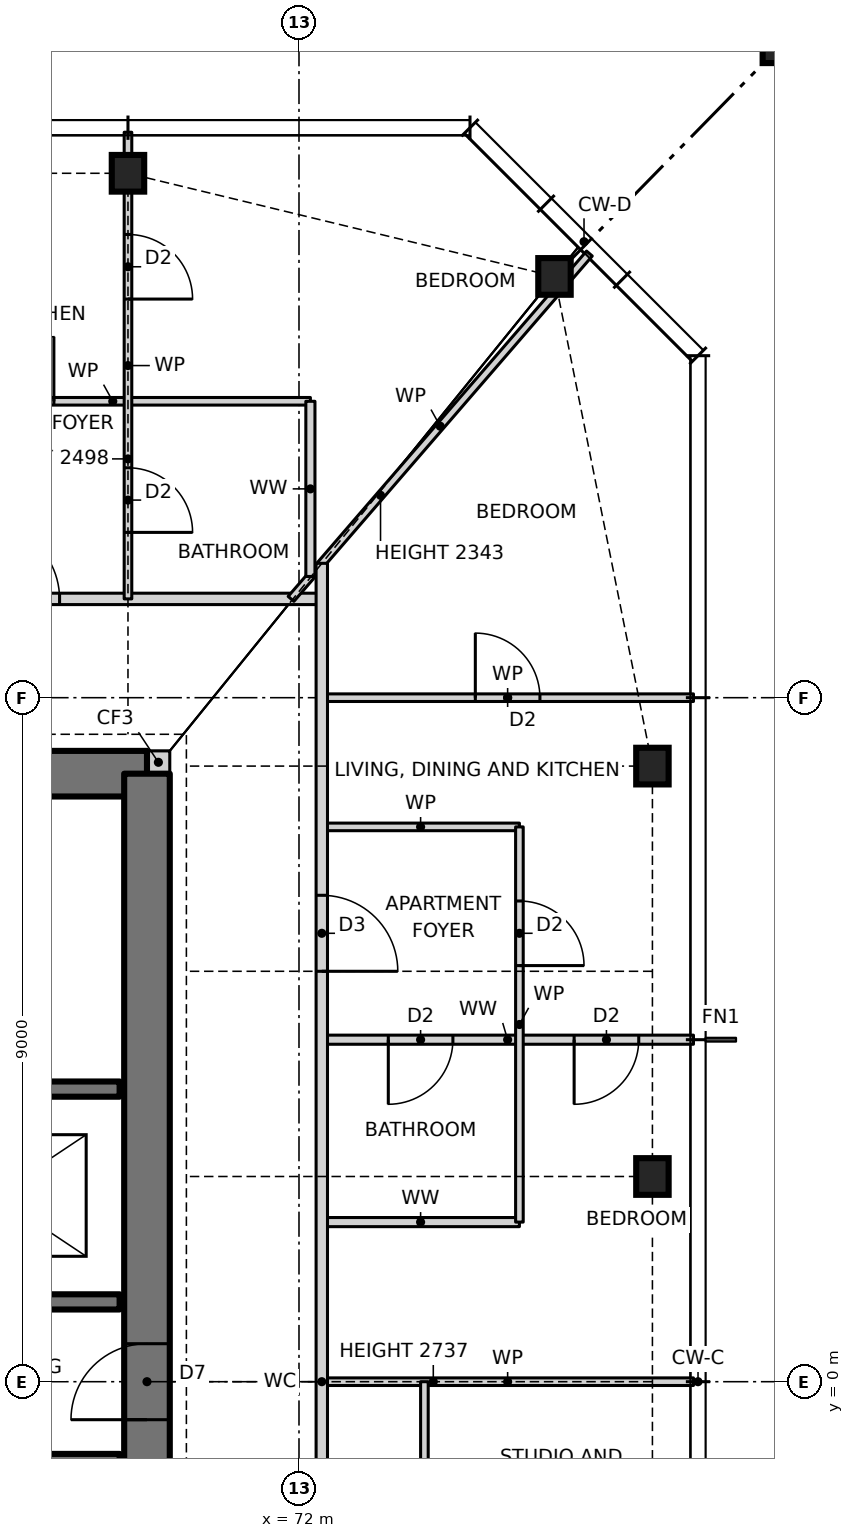
"""IFC4 building model, lengths in metres.
Left out: names, types, materials, properties, quantities, classifications, styles, units other than length and angle.
Written with IfcOpenShell. Run it as: python <this file> out.ifc"""

import sys

from ifc_helpers import new_model, si_unit, direction, frame, frame_2d, origin, origin_2d, place, context, subcontext, project, spatial, rectangle, hollow_rectangle, i_section, extrude, element, fill, save


model = new_model("IFC4")
c1 = context("Model", 3, precision=1e-05, world=origin(), true_north=direction((0.0, 1.0)))
c2 = subcontext(c1, "Body", "Model", "MODEL_VIEW")
j1 = project(units=[si_unit("LENGTHUNIT", "METRE"), si_unit("PLANEANGLEUNIT", "RADIAN")], contexts=[c1])
p1 = place(None, origin())
s1 = spatial("IfcSite", under=j1, at=p1, CompositionType="ELEMENT")
p2 = place(p1, origin())
s2 = spatial("IfcBuilding", under=s1, at=p2, CompositionType="ELEMENT")
p3 = place(p2, frame((0.0, 0.0, 94.5)))
s3 = spatial("IfcBuildingStorey", under=s2, at=p3, CompositionType="ELEMENT", Elevation=94.5)
for number, where, z_axis, x_axis in (
    (1, (76.65, 2.7, 0.0), (0.0, 0.0, 1.0), (1.0, 0.0, 0.0)),
    (2, (76.65, 8.1, 0.0), (0.0, 0.0, 1.0), (1.0, 0.0, 0.0)),
    (3, (75.361, 14.543, 0.0), (0.0, 0.0, 1.0), (1.0, 0.0, 0.0)),
    (4, (69.75, 15.9, 0.0), (0.0, 0.0, 1.0), (1.0, 0.0, 0.0)),
):
    element("IfcColumn", number, at=place(p3, frame(where, z_axis=z_axis, x_axis=x_axis)), inside=s3, PredefinedType="COLUMN", context=c2, shape_type="SweptSolid", body=[
        extrude(i_section(OverallWidth=0.427, OverallDepth=0.483, WebThickness=0.051, FlangeThickness=0.082, at=origin_2d()), origin(), (0.0, 0.0, 1.0), 3.5),
    ])
p4 = place(p3, frame((78.65, 17.9, 0.0), z_axis=(0.0, 0.0, 1.0), x_axis=(1.0, 0.0, 0.0)))
e5 = element("IfcColumn", 5, at=p4, inside=s3, PredefinedType="COLUMN", context=c2, shape_type="SweptSolid", body=[
    extrude(hollow_rectangle(XDim=1.1, YDim=1.1, WallThickness=0.06, at=origin_2d()), origin(), (0.0, 0.0, 1.0), 3.5),
])
p5 = place(p3, frame((70.0, 8.15, 0.0), z_axis=(0.0, 0.0, 1.0), x_axis=(1.0, 0.0, 0.0)))
e6 = element("IfcWall", 6, at=p5, inside=s3, PredefinedType="SOLIDWALL", context=c2, shape_type="SweptSolid", body=[
    extrude(rectangle(XDim=0.3, YDim=0.3, at=frame_2d((0.15, 0.0))), origin(), (0.0, 0.0, 1.0), 3.5),
])
p6 = place(p3, frame((70.0, 8.0, 0.0), z_axis=(0.0, 0.0, 1.0), x_axis=(-1.0, 0.0, 0.0)))
e7 = element("IfcWall", 7, at=p6, inside=s3, PredefinedType="SHEAR", context=c2, shape_type="SweptSolid", body=[
    extrude(rectangle(XDim=14.0, YDim=0.6, at=frame_2d((7.0, 0.0))), origin(), (0.0, 0.0, 1.0), 3.5),
])
p7 = place(p6, frame((8.2, 0.0, 0.0)))
e8 = element("IfcOpeningElement", 8, at=p7, cuts=e7, PredefinedType="OPENING", context=c2, shape_type="SweptSolid", body=[
    extrude(rectangle(XDim=0.9, YDim=2.1, at=frame_2d((0.45, 1.05))), frame((0.0, 0.31, 0.0), z_axis=(0.0, -1.0, 0.0), x_axis=(1.0, 0.0, 0.0)), (0.0, 0.0, 1.0), 0.62),
])
p8 = place(p6, frame((3.2, 0.0, 0.0)))
e9 = element("IfcOpeningElement", 9, at=p8, cuts=e7, PredefinedType="OPENING", context=c2, shape_type="SweptSolid", body=[
    extrude(rectangle(XDim=0.9, YDim=2.1, at=frame_2d((0.45, 1.05))), frame((0.0, 0.31, 0.0), z_axis=(0.0, -1.0, 0.0), x_axis=(1.0, 0.0, 0.0)), (0.0, 0.0, 1.0), 0.62),
])
p9 = place(p3, frame((70.0, -8.0, 0.0), z_axis=(0.0, 0.0, 1.0), x_axis=(0.0, 1.0, 0.0)))
e10 = element("IfcWall", 10, at=p9, inside=s3, PredefinedType="SHEAR", context=c2, shape_type="SweptSolid", body=[
    extrude(rectangle(XDim=16.0, YDim=0.6, at=frame_2d((8.0, 0.0))), origin(), (0.0, 0.0, 1.0), 3.5),
])
p10 = place(p9, frame((7.5, 0.0, 0.0)))
e11 = element("IfcOpeningElement", 11, at=p10, cuts=e10, PredefinedType="OPENING", context=c2, shape_type="SweptSolid", body=[
    extrude(rectangle(XDim=1.0, YDim=2.1, at=frame_2d((0.5, 1.05))), frame((0.0, 0.31, 0.0), z_axis=(0.0, -1.0, 0.0), x_axis=(1.0, 0.0, 0.0)), (0.0, 0.0, 1.0), 0.62),
])
p11 = place(p3, frame((56.36, -1.05, 0.0), z_axis=(0.0, 0.0, 1.0), x_axis=(1.0, 0.0, 0.0)))
e12 = element("IfcWall", 12, at=p11, inside=s3, PredefinedType="SOLIDWALL", context=c2, shape_type="SweptSolid", body=[
    extrude(rectangle(XDim=13.28, YDim=0.2, at=frame_2d((6.64, 0.0))), origin(), (0.0, 0.0, 1.0), 3.5),
])
p12 = place(p11, frame((11.11, 0.0, 0.0)))
e13 = element("IfcOpeningElement", 13, at=p12, cuts=e12, PredefinedType="OPENING", context=c2, shape_type="SweptSolid", body=[
    extrude(rectangle(XDim=1.0, YDim=2.1, at=frame_2d((0.5, 1.05))), frame((0.0, 0.11, 0.0), z_axis=(0.0, -1.0, 0.0), x_axis=(1.0, 0.0, 0.0)), (0.0, 0.0, 1.0), 0.22),
])
p13 = place(p11, frame((1.087, 0.0, 0.0)))
e14 = element("IfcOpeningElement", 14, at=p13, cuts=e12, PredefinedType="OPENING", context=c2, shape_type="SweptSolid", body=[
    extrude(rectangle(XDim=1.1, YDim=2.1, at=frame_2d((0.55, 1.05))), frame((0.0, 0.11, 0.0), z_axis=(0.0, -1.0, 0.0), x_axis=(1.0, 0.0, 0.0)), (0.0, 0.0, 1.0), 0.22),
])
p14 = place(p11, frame((4.39, 0.0, 0.0)))
e15 = element("IfcOpeningElement", 15, at=p14, cuts=e12, PredefinedType="OPENING", context=c2, shape_type="SweptSolid", body=[
    extrude(rectangle(XDim=1.1, YDim=2.1, at=frame_2d((0.55, 1.05))), frame((0.0, 0.11, 0.0), z_axis=(0.0, -1.0, 0.0), x_axis=(1.0, 0.0, 0.0)), (0.0, 0.0, 1.0), 0.22),
])
p15 = place(p11, frame((7.724, 0.0, 0.0)))
e16 = element("IfcOpeningElement", 16, at=p15, cuts=e12, PredefinedType="OPENING", context=c2, shape_type="SweptSolid", body=[
    extrude(rectangle(XDim=1.1, YDim=2.1, at=frame_2d((0.55, 1.05))), frame((0.0, 0.11, 0.0), z_axis=(0.0, -1.0, 0.0), x_axis=(1.0, 0.0, 0.0)), (0.0, 0.0, 1.0), 0.22),
])
p16 = place(p3, frame((72.3, 0.0, 0.0), z_axis=(0.0, 0.0, 1.0), x_axis=(1.0, 0.0, 0.0)))
e17 = element("IfcWall", 17, at=p16, inside=s3, PredefinedType="PARTITIONING", context=c2, shape_type="SweptSolid", body=[
    extrude(rectangle(XDim=4.89, YDim=0.1, at=frame_2d((2.445, 0.0))), origin(), (0.0, 0.0, 1.0), 2.737),
])
p17 = place(p3, frame((56.36, 1.05, 0.0), z_axis=(0.0, 0.0, 1.0), x_axis=(1.0, 0.0, 0.0)))
e18 = element("IfcWall", 18, at=p17, inside=s3, PredefinedType="SOLIDWALL", context=c2, shape_type="SweptSolid", body=[
    extrude(rectangle(XDim=13.28, YDim=0.2, at=frame_2d((6.64, 0.0))), origin(), (0.0, 0.0, 1.0), 3.5),
])
p18 = place(p17, frame((1.17, 0.0, 0.0)))
e19 = element("IfcOpeningElement", 19, at=p18, cuts=e18, PredefinedType="OPENING", context=c2, shape_type="SweptSolid", body=[
    extrude(rectangle(XDim=1.0, YDim=2.1, at=frame_2d((0.5, 1.05))), frame((0.0, 0.11, 0.0), z_axis=(0.0, -1.0, 0.0), x_axis=(1.0, 0.0, 0.0)), (0.0, 0.0, 1.0), 0.22),
])
p19 = place(p17, frame((6.19, 0.0, 0.0)))
e20 = element("IfcOpeningElement", 20, at=p19, cuts=e18, PredefinedType="OPENING", context=c2, shape_type="SweptSolid", body=[
    extrude(rectangle(XDim=0.9, YDim=2.1, at=frame_2d((0.45, 1.05))), frame((0.0, 0.11, 0.0), z_axis=(0.0, -1.0, 0.0), x_axis=(1.0, 0.0, 0.0)), (0.0, 0.0, 1.0), 0.22),
])
p20 = place(p17, frame((10.96, 0.0, 0.0)))
e21 = element("IfcOpeningElement", 21, at=p20, cuts=e18, PredefinedType="OPENING", context=c2, shape_type="SweptSolid", body=[
    extrude(rectangle(XDim=1.3, YDim=2.1, at=frame_2d((0.65, 1.05))), frame((0.0, 0.11, 0.0), z_axis=(0.0, -1.0, 0.0), x_axis=(1.0, 0.0, 0.0)), (0.0, 0.0, 1.0), 0.22),
])
p21 = place(p3, frame((72.3, 2.1, 0.0), z_axis=(0.0, 0.0, 1.0), x_axis=(1.0, 0.0, 0.0)))
e22 = element("IfcWall", 22, at=p21, inside=s3, PredefinedType="PARTITIONING", context=c2, shape_type="SweptSolid", body=[
    extrude(rectangle(XDim=2.6, YDim=0.12, at=frame_2d((1.3, 0.0))), origin(), (0.0, 0.0, 1.0), 3.27),
])
p22 = place(p3, frame((59.7, 3.85, 0.0), z_axis=(0.0, 0.0, 1.0), x_axis=(1.0, 0.0, 0.0)))
e23 = element("IfcWall", 23, at=p22, inside=s3, PredefinedType="SOLIDWALL", context=c2, shape_type="SweptSolid", body=[
    extrude(rectangle(XDim=9.94, YDim=0.2, at=frame_2d((4.97, 0.0))), origin(), (0.0, 0.0, 1.0), 3.5),
])
p23 = place(p3, frame((72.3, 4.5, 0.0), z_axis=(0.0, 0.0, 1.0), x_axis=(1.0, 0.0, 0.0)))
e24 = element("IfcWall", 24, at=p23, inside=s3, PredefinedType="PARTITIONING", context=c2, shape_type="SweptSolid", body=[
    extrude(rectangle(XDim=4.89, YDim=0.12, at=frame_2d((2.445, 0.0))), origin(), (0.0, 0.0, 1.0), 3.27),
])
p24 = place(p23, frame((0.875, 0.0, 0.0)))
e25 = element("IfcOpeningElement", 25, at=p24, cuts=e24, PredefinedType="OPENING", context=c2, shape_type="SweptSolid", body=[
    extrude(rectangle(XDim=0.85, YDim=2.1, at=frame_2d((0.425, 1.05))), frame((0.0, 0.07, 0.0), z_axis=(0.0, -1.0, 0.0), x_axis=(1.0, 0.0, 0.0)), (0.0, 0.0, 1.0), 0.14),
])
p25 = place(p23, frame((3.32, 0.0, 0.0)))
e26 = element("IfcOpeningElement", 26, at=p25, cuts=e24, PredefinedType="OPENING", context=c2, shape_type="SweptSolid", body=[
    extrude(rectangle(XDim=0.85, YDim=2.1, at=frame_2d((0.425, 1.05))), frame((0.0, 0.07, 0.0), z_axis=(0.0, -1.0, 0.0), x_axis=(1.0, 0.0, 0.0)), (0.0, 0.0, 1.0), 0.14),
])
p26 = place(p3, frame((72.3, 7.3, 0.0), z_axis=(0.0, 0.0, 1.0), x_axis=(1.0, 0.0, 0.0)))
e27 = element("IfcWall", 27, at=p26, inside=s3, PredefinedType="PARTITIONING", context=c2, shape_type="SweptSolid", body=[
    extrude(rectangle(XDim=2.6, YDim=0.1, at=frame_2d((1.3, 0.0))), origin(), (0.0, 0.0, 1.0), 3.27),
])
p27 = place(p3, frame((72.3, 9.0, 0.0), z_axis=(0.0, 0.0, 1.0), x_axis=(1.0, 0.0, 0.0)))
e28 = element("IfcWall", 28, at=p27, inside=s3, PredefinedType="PARTITIONING", context=c2, shape_type="SweptSolid", body=[
    extrude(rectangle(XDim=4.89, YDim=0.1, at=frame_2d((2.445, 0.0))), origin(), (0.0, 0.0, 1.0), 3.27),
])
p28 = place(p27, frame((2.02, 0.0, 0.0)))
e29 = element("IfcOpeningElement", 29, at=p28, cuts=e28, PredefinedType="OPENING", context=c2, shape_type="SweptSolid", body=[
    extrude(rectangle(XDim=0.85, YDim=2.1, at=frame_2d((0.425, 1.05))), frame((0.0, 0.06, 0.0), z_axis=(0.0, -1.0, 0.0), x_axis=(1.0, 0.0, 0.0)), (0.0, 0.0, 1.0), 0.12),
])
p29 = place(p3, frame((53.7, 10.3, 0.0), z_axis=(0.0, 0.0, 1.0), x_axis=(1.0, 0.0, 0.0)))
e30 = element("IfcWall", 30, at=p29, inside=s3, PredefinedType="PARTITIONING", context=c2, shape_type="SweptSolid", body=[
    extrude(rectangle(XDim=18.6, YDim=0.15, at=frame_2d((9.3, 0.0))), origin(), (0.0, 0.0, 1.0), 3.27),
])
p30 = place(p29, frame((14.15, 0.0, 0.0)))
e31 = element("IfcOpeningElement", 31, at=p30, cuts=e30, PredefinedType="OPENING", context=c2, shape_type="SweptSolid", body=[
    extrude(rectangle(XDim=1.0, YDim=2.1, at=frame_2d((0.5, 1.05))), frame((0.0, 0.085, 0.0), z_axis=(0.0, -1.0, 0.0), x_axis=(1.0, 0.0, 0.0)), (0.0, 0.0, 1.0), 0.17),
])
p31 = place(p29, frame((9.925, 0.0, 0.0)))
e32 = element("IfcOpeningElement", 32, at=p31, cuts=e30, PredefinedType="OPENING", context=c2, shape_type="SweptSolid", body=[
    extrude(rectangle(XDim=1.0, YDim=2.1, at=frame_2d((0.5, 1.05))), frame((0.0, 0.085, 0.0), z_axis=(0.0, -1.0, 0.0), x_axis=(1.0, 0.0, 0.0)), (0.0, 0.0, 1.0), 0.17),
])
p32 = place(p29, frame((5.15, 0.0, 0.0)))
e33 = element("IfcOpeningElement", 33, at=p32, cuts=e30, PredefinedType="OPENING", context=c2, shape_type="SweptSolid", body=[
    extrude(rectangle(XDim=1.0, YDim=2.1, at=frame_2d((0.5, 1.05))), frame((0.0, 0.085, 0.0), z_axis=(0.0, -1.0, 0.0), x_axis=(1.0, 0.0, 0.0)), (0.0, 0.0, 1.0), 0.17),
])
p33 = place(p3, frame((66.95, 12.9, 0.0), z_axis=(0.0, 0.0, 1.0), x_axis=(1.0, 0.0, 0.0)))
e34 = element("IfcWall", 34, at=p33, inside=s3, PredefinedType="PARTITIONING", context=c2, shape_type="SweptSolid", body=[
    extrude(rectangle(XDim=5.2, YDim=0.1, at=frame_2d((2.6, 0.0))), origin(), (0.0, 0.0, 1.0), 3.27),
])
p34 = place(p33, frame((0.975, 0.0, 0.0)))
e35 = element("IfcOpeningElement", 35, at=p34, cuts=e34, PredefinedType="OPENING", context=c2, shape_type="SweptSolid", body=[
    extrude(rectangle(XDim=0.85, YDim=2.1, at=frame_2d((0.425, 1.05))), frame((0.0, 0.06, 0.0), z_axis=(0.0, -1.0, 0.0), x_axis=(1.0, 0.0, 0.0)), (0.0, 0.0, 1.0), 0.12),
])
p35 = place(p3, frame((71.895, 10.3, 0.0), z_axis=(0.0, 0.0, 1.0), x_axis=(0.65378286253, 0.756682211144, 0.0)))
e36 = element("IfcWall", 36, at=p35, inside=s3, PredefinedType="PARTITIONING", context=c2, shape_type="SweptSolid", body=[
    extrude(rectangle(XDim=6.005, YDim=0.1, at=frame_2d((3.002, 0.0))), origin(), (0.0, 0.0, 1.0), 2.343),
])
p36 = place(p3, frame((74.9, 2.1, 0.0), z_axis=(0.0, 0.0, 1.0), x_axis=(0.0, 1.0, 0.0)))
e37 = element("IfcWall", 37, at=p36, inside=s3, PredefinedType="PARTITIONING", context=c2, shape_type="SweptSolid", body=[
    extrude(rectangle(XDim=5.2, YDim=0.1, at=frame_2d((2.6, 0.0))), origin(), (0.0, 0.0, 1.0), 3.27),
])
p37 = place(p36, frame((3.375, 0.0, 0.0)))
e38 = element("IfcOpeningElement", 38, at=p37, cuts=e37, PredefinedType="OPENING", context=c2, shape_type="SweptSolid", body=[
    extrude(rectangle(XDim=0.85, YDim=2.1, at=frame_2d((0.425, 1.05))), frame((0.0, 0.06, 0.0), z_axis=(0.0, -1.0, 0.0), x_axis=(1.0, 0.0, 0.0)), (0.0, 0.0, 1.0), 0.12),
])
p38 = place(p3, frame((73.65, -4.5, 0.0), z_axis=(0.0, 0.0, 1.0), x_axis=(0.0, 1.0, 0.0)))
e39 = element("IfcWall", 39, at=p38, inside=s3, PredefinedType="PARTITIONING", context=c2, shape_type="SweptSolid", body=[
    extrude(rectangle(XDim=4.5, YDim=0.1, at=frame_2d((2.25, 0.0))), origin(), (0.0, 0.0, 1.0), 3.27),
])
p39 = place(p38, frame((0.7, 0.0, 0.0)))
e40 = element("IfcOpeningElement", 40, at=p39, cuts=e39, PredefinedType="OPENING", context=c2, shape_type="SweptSolid", body=[
    extrude(rectangle(XDim=0.85, YDim=2.1, at=frame_2d((0.425, 1.05))), frame((0.0, 0.06, 0.0), z_axis=(0.0, -1.0, 0.0), x_axis=(1.0, 0.0, 0.0)), (0.0, 0.0, 1.0), 0.12),
])
p40 = place(p3, frame((72.3, -10.768, 0.0), z_axis=(0.0, 0.0, 1.0), x_axis=(0.0, 1.0, 0.0)))
e41 = element("IfcWall", 41, at=p40, inside=s3, PredefinedType="PARTITIONING", context=c2, shape_type="SweptSolid", body=[
    extrude(rectangle(XDim=21.536, YDim=0.15, at=frame_2d((10.768, 0.0))), origin(), (0.0, 0.0, 1.0), 3.27),
])
p41 = place(p40, frame((2.668, 0.0, 0.0)))
e42 = element("IfcOpeningElement", 42, at=p41, cuts=e41, PredefinedType="OPENING", context=c2, shape_type="SweptSolid", body=[
    extrude(rectangle(XDim=1.0, YDim=2.1, at=frame_2d((0.5, 1.05))), frame((0.0, 0.085, 0.0), z_axis=(0.0, -1.0, 0.0), x_axis=(1.0, 0.0, 0.0)), (0.0, 0.0, 1.0), 0.17),
])
p42 = place(p40, frame((6.893, 0.0, 0.0)))
e43 = element("IfcOpeningElement", 43, at=p42, cuts=e41, PredefinedType="OPENING", context=c2, shape_type="SweptSolid", body=[
    extrude(rectangle(XDim=1.0, YDim=2.1, at=frame_2d((0.5, 1.05))), frame((0.0, 0.085, 0.0), z_axis=(0.0, -1.0, 0.0), x_axis=(1.0, 0.0, 0.0)), (0.0, 0.0, 1.0), 0.17),
])
p43 = place(p40, frame((16.168, 0.0, 0.0)))
e44 = element("IfcOpeningElement", 44, at=p43, cuts=e41, PredefinedType="OPENING", context=c2, shape_type="SweptSolid", body=[
    extrude(rectangle(XDim=1.0, YDim=2.1, at=frame_2d((0.5, 1.05))), frame((0.0, 0.085, 0.0), z_axis=(0.0, -1.0, 0.0), x_axis=(1.0, 0.0, 0.0)), (0.0, 0.0, 1.0), 0.17),
])
p44 = place(p3, frame((72.15, 10.595, 0.0), z_axis=(0.0, 0.0, 1.0), x_axis=(0.0, 1.0, 0.0)))
e45 = element("IfcWall", 45, at=p44, inside=s3, PredefinedType="PARTITIONING", context=c2, shape_type="SweptSolid", body=[
    extrude(rectangle(XDim=2.305, YDim=0.12, at=frame_2d((1.152, 0.0))), origin(), (0.0, 0.0, 1.0), 3.27),
])
p45 = place(p3, frame((69.75, 10.3, 0.0), z_axis=(0.0, 0.0, 1.0), x_axis=(0.0, 1.0, 0.0)))
e46 = element("IfcWall", 46, at=p45, inside=s3, PredefinedType="PARTITIONING", context=c2, shape_type="SweptSolid", body=[
    extrude(rectangle(XDim=6.14, YDim=0.1, at=frame_2d((3.07, 0.0))), origin(), (0.0, 0.0, 1.0), 2.498),
])
p46 = place(p45, frame((0.875, 0.0, 0.0)))
e47 = element("IfcOpeningElement", 47, at=p46, cuts=e46, PredefinedType="OPENING", context=c2, shape_type="SweptSolid", body=[
    extrude(rectangle(XDim=0.85, YDim=2.1, at=frame_2d((0.425, 1.05))), frame((0.0, 0.06, 0.0), z_axis=(0.0, -1.0, 0.0), x_axis=(1.0, 0.0, 0.0)), (0.0, 0.0, 1.0), 0.12),
])
p47 = place(p45, frame((3.945, 0.0, 0.0)))
e48 = element("IfcOpeningElement", 48, at=p47, cuts=e46, PredefinedType="OPENING", context=c2, shape_type="SweptSolid", body=[
    extrude(rectangle(XDim=0.85, YDim=2.1, at=frame_2d((0.425, 1.05))), frame((0.0, 0.06, 0.0), z_axis=(0.0, -1.0, 0.0), x_axis=(1.0, 0.0, 0.0)), (0.0, 0.0, 1.0), 0.12),
])
p48 = place(p43, frame((1.0, 0.0, 0.0), z_axis=(0.0, 0.0, 1.0), x_axis=(-1.0, 0.0, 0.0)))
e49 = element("IfcDoor", 49, at=p48, inside=s3, OperationType="SINGLE_SWING_RIGHT", PredefinedType="DOOR", context=c2, shape_type="SweptSolid", body=[
    extrude(rectangle(XDim=1.0, YDim=2.1, at=frame_2d((0.5, 1.05))), frame((0.0, 0.025, 0.0), z_axis=(0.0, -1.0, 0.0), x_axis=(1.0, 0.0, 0.0)), (0.0, 0.0, 1.0), 0.05),
])
fill(e44, e49)
p49 = place(p37, frame((0.85, 0.0, 0.0), z_axis=(0.0, 0.0, 1.0), x_axis=(-1.0, 0.0, 0.0)))
e50 = element("IfcDoor", 50, at=p49, inside=s3, OperationType="SINGLE_SWING_RIGHT", PredefinedType="DOOR", context=c2, shape_type="SweptSolid", body=[
    extrude(rectangle(XDim=0.85, YDim=2.1, at=frame_2d((0.425, 1.05))), frame((0.0, 0.025, 0.0), z_axis=(0.0, -1.0, 0.0), x_axis=(1.0, 0.0, 0.0)), (0.0, 0.0, 1.0), 0.05),
])
fill(e38, e50)
p50 = place(p24, frame((0.85, 0.0, 0.0), z_axis=(0.0, 0.0, 1.0), x_axis=(-1.0, 0.0, 0.0)))
e51 = element("IfcDoor", 51, at=p50, inside=s3, OperationType="SINGLE_SWING_RIGHT", PredefinedType="DOOR", context=c2, shape_type="SweptSolid", body=[
    extrude(rectangle(XDim=0.85, YDim=2.1, at=frame_2d((0.425, 1.05))), frame((0.0, 0.025, 0.0), z_axis=(0.0, -1.0, 0.0), x_axis=(1.0, 0.0, 0.0)), (0.0, 0.0, 1.0), 0.05),
])
fill(e25, e51)
p51 = place(p25, frame((0.85, 0.0, 0.0), z_axis=(0.0, 0.0, 1.0), x_axis=(-1.0, 0.0, 0.0)))
e52 = element("IfcDoor", 52, at=p51, inside=s3, OperationType="SINGLE_SWING_RIGHT", PredefinedType="DOOR", context=c2, shape_type="SweptSolid", body=[
    extrude(rectangle(XDim=0.85, YDim=2.1, at=frame_2d((0.425, 1.05))), frame((0.0, 0.025, 0.0), z_axis=(0.0, -1.0, 0.0), x_axis=(1.0, 0.0, 0.0)), (0.0, 0.0, 1.0), 0.05),
])
fill(e26, e52)
p52 = place(p28, origin())
e53 = element("IfcDoor", 53, at=p52, inside=s3, OperationType="SINGLE_SWING_LEFT", PredefinedType="DOOR", context=c2, shape_type="SweptSolid", body=[
    extrude(rectangle(XDim=0.85, YDim=2.1, at=frame_2d((0.425, 1.05))), frame((0.0, 0.025, 0.0), z_axis=(0.0, -1.0, 0.0), x_axis=(1.0, 0.0, 0.0)), (0.0, 0.0, 1.0), 0.05),
])
fill(e29, e53)
p53 = place(p30, origin())
e54 = element("IfcDoor", 54, at=p53, inside=s3, OperationType="SINGLE_SWING_LEFT", PredefinedType="DOOR", context=c2, shape_type="SweptSolid", body=[
    extrude(rectangle(XDim=1.0, YDim=2.1, at=frame_2d((0.5, 1.05))), frame((0.0, 0.025, 0.0), z_axis=(0.0, -1.0, 0.0), x_axis=(1.0, 0.0, 0.0)), (0.0, 0.0, 1.0), 0.05),
])
fill(e31, e54)
p54 = place(p34, origin())
e55 = element("IfcDoor", 55, at=p54, inside=s3, OperationType="SINGLE_SWING_RIGHT", PredefinedType="DOOR", context=c2, shape_type="SweptSolid", body=[
    extrude(rectangle(XDim=0.85, YDim=2.1, at=frame_2d((0.425, 1.05))), frame((0.0, 0.025, 0.0), z_axis=(0.0, -1.0, 0.0), x_axis=(1.0, 0.0, 0.0)), (0.0, 0.0, 1.0), 0.05),
])
fill(e35, e55)
p55 = place(p46, frame((0.85, 0.0, 0.0), z_axis=(0.0, 0.0, 1.0), x_axis=(-1.0, 0.0, 0.0)))
e56 = element("IfcDoor", 56, at=p55, inside=s3, OperationType="SINGLE_SWING_RIGHT", PredefinedType="DOOR", context=c2, shape_type="SweptSolid", body=[
    extrude(rectangle(XDim=0.85, YDim=2.1, at=frame_2d((0.425, 1.05))), frame((0.0, 0.025, 0.0), z_axis=(0.0, -1.0, 0.0), x_axis=(1.0, 0.0, 0.0)), (0.0, 0.0, 1.0), 0.05),
])
fill(e47, e56)
p56 = place(p47, frame((0.85, 0.0, 0.0), z_axis=(0.0, 0.0, 1.0), x_axis=(-1.0, 0.0, 0.0)))
e57 = element("IfcDoor", 57, at=p56, inside=s3, OperationType="SINGLE_SWING_RIGHT", PredefinedType="DOOR", context=c2, shape_type="SweptSolid", body=[
    extrude(rectangle(XDim=0.85, YDim=2.1, at=frame_2d((0.425, 1.05))), frame((0.0, 0.025, 0.0), z_axis=(0.0, -1.0, 0.0), x_axis=(1.0, 0.0, 0.0)), (0.0, 0.0, 1.0), 0.05),
])
fill(e48, e57)
p57 = place(p10, origin())
e58 = element("IfcDoor", 58, at=p57, inside=s3, OperationType="SINGLE_SWING_LEFT", PredefinedType="DOOR", context=c2, shape_type="SweptSolid", body=[
    extrude(rectangle(XDim=1.0, YDim=2.1, at=frame_2d((0.5, 1.05))), frame((0.0, 0.025, 0.0), z_axis=(0.0, -1.0, 0.0), x_axis=(1.0, 0.0, 0.0)), (0.0, 0.0, 1.0), 0.05),
])
fill(e11, e58)
save(model, sys.argv[1])
